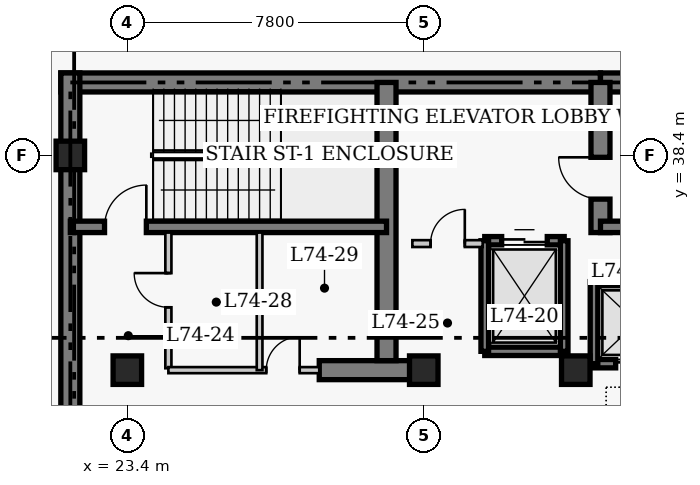
"""IFC4 building model, lengths in metres.
Left out: names, types, materials, properties, quantities, classifications, styles, units other than length and angle.
Written with IfcOpenShell. Run it as: python <this file> out.ifc"""

import sys

from ifc_helpers import new_model, si_unit, direction, frame, frame_2d, origin, origin_2d, place, context, subcontext, project, spatial, rectangle, extrude, element, fill, save


model = new_model("IFC4")
c1 = context("Model", 3, precision=1e-05, world=origin(), true_north=direction((0.0, 1.0)))
c2 = subcontext(c1, "Body", "Model", "MODEL_VIEW")
j1 = project(units=[si_unit("LENGTHUNIT", "METRE"), si_unit("PLANEANGLEUNIT", "RADIAN")], contexts=[c1])
p1 = place(None, origin())
s1 = spatial("IfcSite", under=j1, at=p1, CompositionType="ELEMENT")
p2 = place(p1, origin())
s2 = spatial("IfcBuilding", under=s1, at=p2, CompositionType="ELEMENT")
p3 = place(p2, frame((0.0, 0.0, 297.4)))
s3 = spatial("IfcBuildingStorey", under=s2, at=p3, CompositionType="ELEMENT", Elevation=297.4)
p4 = place(p3, frame((21.65, 40.32, 0.0), z_axis=(0.0, 0.0, 1.0), x_axis=(1.0, 0.0, 0.0)))
e1 = element("IfcWall", 1, at=p4, inside=s3, PredefinedType="SHEAR", context=c2, shape_type="SweptSolid", body=[
    extrude(rectangle(XDim=14.2, YDim=0.5, at=frame_2d((7.1, 0.0))), origin(), (0.0, 0.0, 1.0), 4.6),
])
p5 = place(p3, frame((35.85, 40.32, 0.0), z_axis=(0.0, 0.0, 1.0), x_axis=(1.0, 0.0, 0.0)))
e2 = element("IfcWall", 2, at=p5, inside=s3, PredefinedType="SHEAR", context=c2, shape_type="SweptSolid", body=[
    extrude(rectangle(XDim=12.6, YDim=0.5, at=frame_2d((6.3, 0.0))), origin(), (0.0, 0.0, 1.0), 4.6),
])
p6 = place(p3, frame((21.9, 27.05, 0.0), z_axis=(0.0, 0.0, 1.0), x_axis=(0.0, 1.0, 0.0)))
e3 = element("IfcWall", 3, at=p6, inside=s3, PredefinedType="SHEAR", context=c2, shape_type="SweptSolid", body=[
    extrude(rectangle(XDim=13.52, YDim=0.5, at=frame_2d((6.76, 0.0))), origin(), (0.0, 0.0, 1.0), 4.6),
])
p7 = place(p3, frame((28.45, 32.75, 0.0), z_axis=(0.0, 0.0, 1.0), x_axis=(1.0, 0.0, 0.0)))
e4 = element("IfcWall", 4, at=p7, inside=s3, PredefinedType="SHEAR", context=c2, shape_type="SweptSolid", body=[
    extrude(rectangle(XDim=2.4, YDim=0.5, at=frame_2d((1.2, 0.0))), origin(), (0.0, 0.0, 1.0), 4.6),
])
p8 = place(p3, frame((30.22, 33.0, 0.0), z_axis=(0.0, 0.0, 1.0), x_axis=(0.0, 1.0, 0.0)))
e5 = element("IfcWall", 5, at=p8, inside=s3, PredefinedType="SHEAR", context=c2, shape_type="SweptSolid", body=[
    extrude(rectangle(XDim=7.32, YDim=0.5, at=frame_2d((3.66, 0.0))), origin(), (0.0, 0.0, 1.0), 4.6),
])
p9 = place(p3, frame((35.85, 36.37, 0.0), z_axis=(0.0, 0.0, 1.0), x_axis=(0.0, 1.0, 0.0)))
e6 = element("IfcWall", 6, at=p9, inside=s3, PredefinedType="SHEAR", context=c2, shape_type="SweptSolid", body=[
    extrude(rectangle(XDim=3.95, YDim=0.5, at=frame_2d((1.975, 0.0))), origin(), (0.0, 0.0, 1.0), 4.6),
])
p10 = place(p9, frame((0.88, 0.0, 0.0)))
e7 = element("IfcOpeningElement", 7, at=p10, cuts=e6, PredefinedType="OPENING", context=c2, shape_type="SweptSolid", body=[
    extrude(rectangle(XDim=1.1, YDim=2.15, at=frame_2d((0.55, 1.075))), frame((0.0, 0.26, 0.0), z_axis=(0.0, -1.0, 0.0), x_axis=(1.0, 0.0, 0.0)), (0.0, 0.0, 1.0), 0.52),
])
p11 = place(p3, frame((21.9, 36.52, 0.0), z_axis=(0.0, 0.0, 1.0), x_axis=(1.0, 0.0, 0.0)))
e8 = element("IfcWall", 8, at=p11, inside=s3, PredefinedType="SHEAR", context=c2, shape_type="SweptSolid", body=[
    extrude(rectangle(XDim=8.32, YDim=0.3, at=frame_2d((4.16, 0.0))), origin(), (0.0, 0.0, 1.0), 4.6),
])
p12 = place(p11, frame((0.9, 0.0, 0.0)))
e9 = element("IfcOpeningElement", 9, at=p12, cuts=e8, PredefinedType="OPENING", context=c2, shape_type="SweptSolid", body=[
    extrude(rectangle(XDim=1.1, YDim=2.15, at=frame_2d((0.55, 1.075))), frame((0.0, 0.16, 0.0), z_axis=(0.0, -1.0, 0.0), x_axis=(1.0, 0.0, 0.0)), (0.0, 0.0, 1.0), 0.32),
])
p13 = place(p3, frame((35.85, 36.52, 0.0), z_axis=(0.0, 0.0, 1.0), x_axis=(1.0, 0.0, 0.0)))
e10 = element("IfcWall", 10, at=p13, inside=s3, PredefinedType="SHEAR", context=c2, shape_type="SweptSolid", body=[
    extrude(rectangle(XDim=8.33, YDim=0.3, at=frame_2d((4.165, 0.0))), origin(), (0.0, 0.0, 1.0), 4.6),
])
for number, where, z_axis, x_axis in (
    (11, (21.9, 38.4, 0.0), (0.0, 0.0, 1.0), (1.0, 0.0, 0.0)),
    (12, (23.4, 32.75, 0.0), (0.0, 0.0, 1.0), (1.0, 0.0, 0.0)),
    (13, (31.2, 32.75, 0.0), (0.0, 0.0, 1.0), (1.0, 0.0, 0.0)),
    (14, (35.2, 32.75, 0.0), (0.0, 0.0, 1.0), (1.0, 0.0, 0.0)),
):
    element("IfcColumn", number, at=place(p3, frame(where, z_axis=z_axis, x_axis=x_axis)), inside=s3, PredefinedType="COLUMN", context=c2, shape_type="SweptSolid", body=[
        extrude(rectangle(XDim=0.75, YDim=0.75, at=origin_2d()), origin(), (0.0, 0.0, 1.0), 4.6),
    ])
p14 = place(p3, frame((35.68, 35.08, 0.0), z_axis=(0.0, 0.0, 1.0), x_axis=(1.0, 0.0, 0.0)))
e15 = element("IfcWall", 15, at=p14, inside=s3, PredefinedType="SHEAR", context=c2, shape_type="SweptSolid", body=[
    extrude(rectangle(XDim=2.32, YDim=0.22, at=frame_2d((1.16, 0.0))), origin(), (0.0, 0.0, 1.0), 4.6),
])
p15 = place(p3, frame((35.68, 32.92, 0.0), z_axis=(0.0, 0.0, 1.0), x_axis=(1.0, 0.0, 0.0)))
e16 = element("IfcWall", 16, at=p15, inside=s3, PredefinedType="SHEAR", context=c2, shape_type="SweptSolid", body=[
    extrude(rectangle(XDim=2.32, YDim=0.22, at=frame_2d((1.16, 0.0))), origin(), (0.0, 0.0, 1.0), 4.6),
])
p16 = place(p15, frame((0.57, 0.0, 0.0)))
e17 = element("IfcOpeningElement", 17, at=p16, cuts=e16, PredefinedType="OPENING", context=c2, shape_type="SweptSolid", body=[
    extrude(rectangle(XDim=1.1, YDim=2.15, at=frame_2d((0.55, 1.075))), frame((0.0, 0.12, 0.0), z_axis=(0.0, -1.0, 0.0), x_axis=(1.0, 0.0, 0.0)), (0.0, 0.0, 1.0), 0.24),
])
p17 = place(p3, frame((35.68, 32.92, 0.0), z_axis=(0.0, 0.0, 1.0), x_axis=(0.0, 1.0, 0.0)))
e18 = element("IfcWall", 18, at=p17, inside=s3, PredefinedType="SHEAR", context=c2, shape_type="SweptSolid", body=[
    extrude(rectangle(XDim=2.16, YDim=0.2, at=frame_2d((1.08, 0.0))), origin(), (0.0, 0.0, 1.0), 4.6),
])
p18 = place(p3, frame((32.805, 36.155, 0.0), z_axis=(0.0, 0.0, 1.0), x_axis=(1.0, 0.0, 0.0)))
e19 = element("IfcWall", 19, at=p18, inside=s3, PredefinedType="SHEAR", context=c2, shape_type="SweptSolid", body=[
    extrude(rectangle(XDim=2.09, YDim=0.22, at=frame_2d((1.045, 0.0))), origin(), (0.0, 0.0, 1.0), 4.6),
])
p19 = place(p18, frame((0.445, 0.0, 0.0)))
e20 = element("IfcOpeningElement", 20, at=p19, cuts=e19, PredefinedType="OPENING", context=c2, shape_type="SweptSolid", body=[
    extrude(rectangle(XDim=1.2, YDim=2.15, at=frame_2d((0.6, 1.075))), frame((0.0, 0.12, 0.0), z_axis=(0.0, -1.0, 0.0), x_axis=(1.0, 0.0, 0.0)), (0.0, 0.0, 1.0), 0.24),
])
p20 = place(p3, frame((32.805, 33.245, 0.0), z_axis=(0.0, 0.0, 1.0), x_axis=(1.0, 0.0, 0.0)))
e21 = element("IfcWall", 21, at=p20, inside=s3, PredefinedType="SHEAR", context=c2, shape_type="SweptSolid", body=[
    extrude(rectangle(XDim=2.09, YDim=0.22, at=frame_2d((1.045, 0.0))), origin(), (0.0, 0.0, 1.0), 4.6),
])
for number, where, z_axis, x_axis in (
    (22, (32.805, 33.245, 0.0), (0.0, 0.0, 1.0), (0.0, 1.0, 0.0)),
    (23, (34.895, 33.245, 0.0), (0.0, 0.0, 1.0), (0.0, 1.0, 0.0)),
):
    element("IfcWall", number, at=place(p3, frame(where, z_axis=z_axis, x_axis=x_axis)), inside=s3, PredefinedType="SHEAR", context=c2, shape_type="SweptSolid", body=[
        extrude(rectangle(XDim=2.91, YDim=0.2, at=frame_2d((1.455, 0.0))), origin(), (0.0, 0.0, 1.0), 4.6),
    ])
p21 = place(p3, frame((30.9, 36.08, 0.0), z_axis=(0.0, 0.0, 1.0), x_axis=(1.0, 0.0, 0.0)))
e24 = element("IfcWall", 24, at=p21, inside=s3, PredefinedType="PARTITIONING", context=c2, shape_type="SweptSolid", body=[
    extrude(rectangle(XDim=1.85, YDim=0.18, at=frame_2d((0.925, 0.0))), origin(), (0.0, 0.0, 1.0), 4.31),
])
p22 = place(p21, frame((0.48, 0.0, 0.0)))
e25 = element("IfcOpeningElement", 25, at=p22, cuts=e24, PredefinedType="OPENING", context=c2, shape_type="SweptSolid", body=[
    extrude(rectangle(XDim=0.9, YDim=2.15, at=frame_2d((0.45, 1.075))), frame((0.0, 0.1, 0.0), z_axis=(0.0, -1.0, 0.0), x_axis=(1.0, 0.0, 0.0)), (0.0, 0.0, 1.0), 0.2),
])
p23 = place(p3, frame((24.48, 32.8, 0.0), z_axis=(0.0, 0.0, 1.0), x_axis=(0.0, 1.0, 0.0)))
e26 = element("IfcWall", 26, at=p23, inside=s3, PredefinedType="PARTITIONING", context=c2, shape_type="SweptSolid", body=[
    extrude(rectangle(XDim=3.57, YDim=0.16, at=frame_2d((1.785, 0.0))), origin(), (0.0, 0.0, 1.0), 4.31),
])
p24 = place(p23, frame((1.604, 0.0, 0.0)))
e27 = element("IfcOpeningElement", 27, at=p24, cuts=e26, PredefinedType="OPENING", context=c2, shape_type="SweptSolid", body=[
    extrude(rectangle(XDim=0.9, YDim=2.1, at=frame_2d((0.45, 1.05))), frame((0.0, 0.09, 0.0), z_axis=(0.0, -1.0, 0.0), x_axis=(1.0, 0.0, 0.0)), (0.0, 0.0, 1.0), 0.18),
])
p25 = place(p3, frame((24.48, 32.75, 0.0), z_axis=(0.0, 0.0, 1.0), x_axis=(1.0, 0.0, 0.0)))
e28 = element("IfcWall", 28, at=p25, inside=s3, PredefinedType="PARTITIONING", context=c2, shape_type="SweptSolid", body=[
    extrude(rectangle(XDim=3.97, YDim=0.16, at=frame_2d((1.985, 0.0))), origin(), (0.0, 0.0, 1.0), 4.31),
])
p26 = place(p25, frame((2.575, 0.0, 0.0)))
e29 = element("IfcOpeningElement", 29, at=p26, cuts=e28, PredefinedType="OPENING", context=c2, shape_type="SweptSolid", body=[
    extrude(rectangle(XDim=0.88, YDim=2.05, at=frame_2d((0.44, 1.025))), frame((0.0, 0.09, 0.0), z_axis=(0.0, -1.0, 0.0), x_axis=(1.0, 0.0, 0.0)), (0.0, 0.0, 1.0), 0.18),
])
p27 = place(p3, frame((26.88, 32.75, 0.0), z_axis=(0.0, 0.0, 1.0), x_axis=(0.0, 1.0, 0.0)))
e30 = element("IfcWall", 30, at=p27, inside=s3, PredefinedType="PARTITIONING", context=c2, shape_type="SweptSolid", body=[
    extrude(rectangle(XDim=3.62, YDim=0.15, at=frame_2d((1.81, 0.0))), origin(), (0.0, 0.0, 1.0), 4.31),
])
p28 = place(p16, origin())
e31 = element("IfcDoor", 31, at=p28, inside=s3, OperationType="DOUBLE_DOOR_SLIDING", PredefinedType="DOOR", context=c2, shape_type="SweptSolid", body=[
    extrude(rectangle(XDim=1.1, YDim=2.15, at=frame_2d((0.55, 1.075))), frame((0.0, 0.025, 0.0), z_axis=(0.0, -1.0, 0.0), x_axis=(1.0, 0.0, 0.0)), (0.0, 0.0, 1.0), 0.05),
])
fill(e17, e31)
p29 = place(p19, origin())
e32 = element("IfcDoor", 32, at=p29, inside=s3, OperationType="DOUBLE_DOOR_SLIDING", PredefinedType="DOOR", context=c2, shape_type="SweptSolid", body=[
    extrude(rectangle(XDim=1.2, YDim=2.15, at=frame_2d((0.6, 1.075))), frame((0.0, 0.025, 0.0), z_axis=(0.0, -1.0, 0.0), x_axis=(1.0, 0.0, 0.0)), (0.0, 0.0, 1.0), 0.05),
])
fill(e20, e32)
p30 = place(p22, origin())
e33 = element("IfcDoor", 33, at=p30, inside=s3, OperationType="SINGLE_SWING_RIGHT", PredefinedType="DOOR", context=c2, shape_type="SweptSolid", body=[
    extrude(rectangle(XDim=0.9, YDim=2.15, at=frame_2d((0.45, 1.075))), frame((0.0, 0.025, 0.0), z_axis=(0.0, -1.0, 0.0), x_axis=(1.0, 0.0, 0.0)), (0.0, 0.0, 1.0), 0.05),
])
fill(e25, e33)
p31 = place(p24, origin())
e34 = element("IfcDoor", 34, at=p31, inside=s3, OperationType="SINGLE_SWING_RIGHT", PredefinedType="DOOR", context=c2, shape_type="SweptSolid", body=[
    extrude(rectangle(XDim=0.9, YDim=2.1, at=frame_2d((0.45, 1.05))), frame((0.0, 0.025, 0.0), z_axis=(0.0, -1.0, 0.0), x_axis=(1.0, 0.0, 0.0)), (0.0, 0.0, 1.0), 0.05),
])
fill(e27, e34)
p32 = place(p26, origin())
e35 = element("IfcDoor", 35, at=p32, inside=s3, OperationType="SINGLE_SWING_RIGHT", PredefinedType="DOOR", context=c2, shape_type="SweptSolid", body=[
    extrude(rectangle(XDim=0.88, YDim=2.05, at=frame_2d((0.44, 1.025))), frame((0.0, 0.025, 0.0), z_axis=(0.0, -1.0, 0.0), x_axis=(1.0, 0.0, 0.0)), (0.0, 0.0, 1.0), 0.05),
])
fill(e29, e35)
p33 = place(p12, origin())
e36 = element("IfcDoor", 36, at=p33, inside=s3, OperationType="SINGLE_SWING_RIGHT", PredefinedType="DOOR", context=c2, shape_type="SweptSolid", body=[
    extrude(rectangle(XDim=1.1, YDim=2.15, at=frame_2d((0.55, 1.075))), frame((0.0, 0.025, 0.0), z_axis=(0.0, -1.0, 0.0), x_axis=(1.0, 0.0, 0.0)), (0.0, 0.0, 1.0), 0.05),
])
fill(e9, e36)
p34 = place(p10, origin())
e37 = element("IfcDoor", 37, at=p34, inside=s3, OperationType="SINGLE_SWING_RIGHT", PredefinedType="DOOR", context=c2, shape_type="SweptSolid", body=[
    extrude(rectangle(XDim=1.1, YDim=2.15, at=frame_2d((0.55, 1.075))), frame((0.0, 0.025, 0.0), z_axis=(0.0, -1.0, 0.0), x_axis=(1.0, 0.0, 0.0)), (0.0, 0.0, 1.0), 0.05),
])
fill(e7, e37)
save(model, sys.argv[1])
